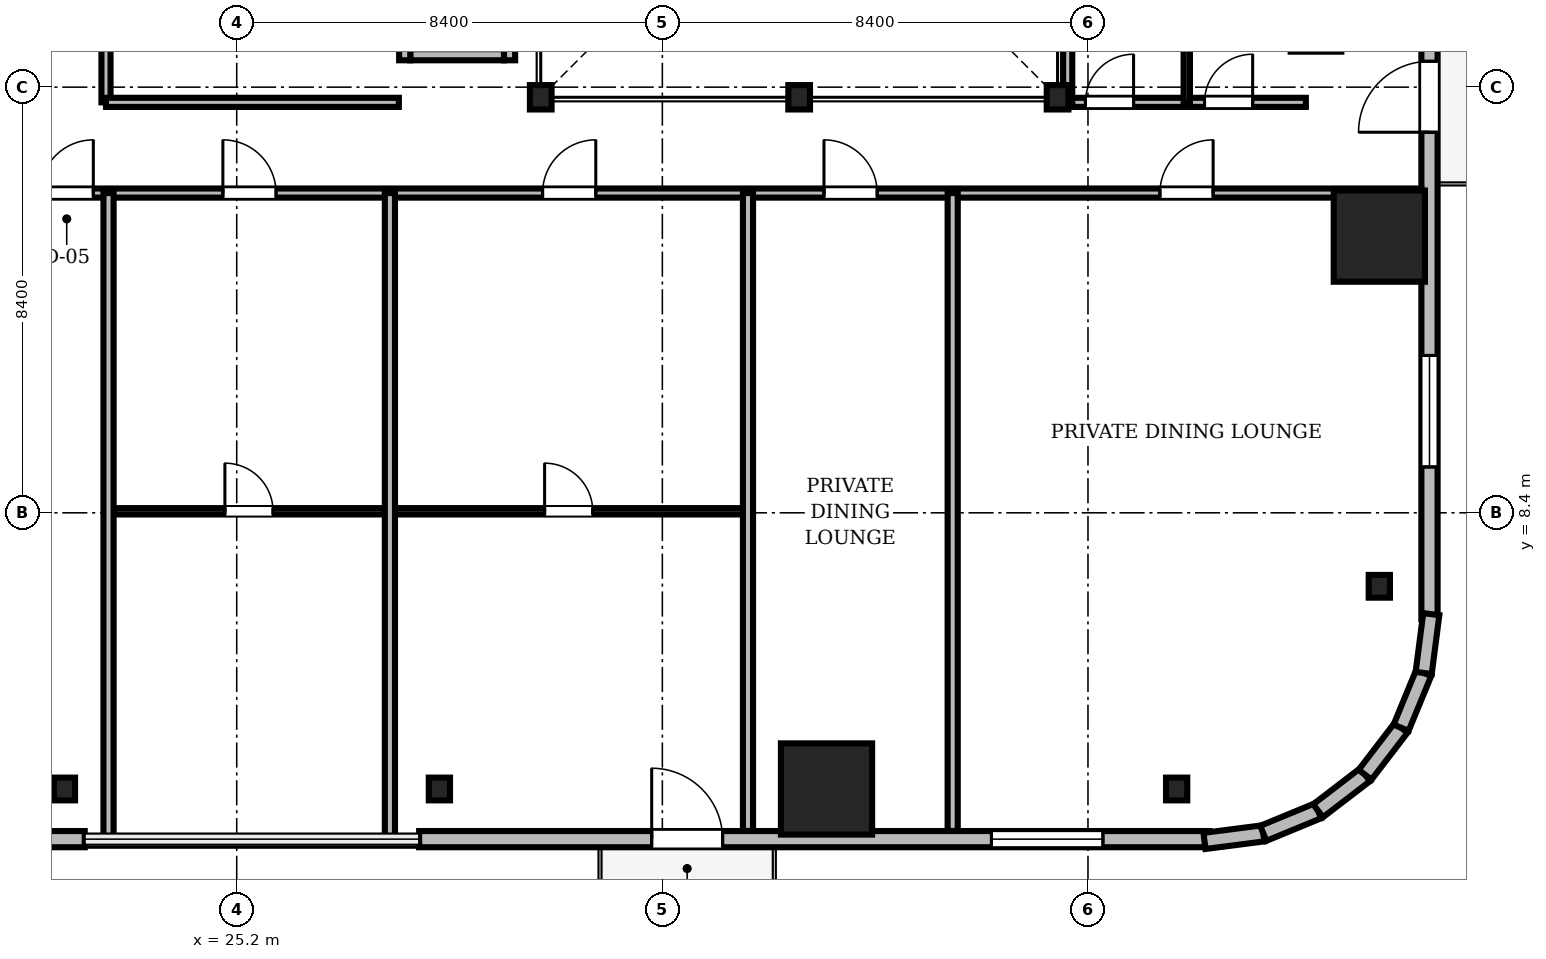
"""IFC4 building model, lengths in metres.
Left out: names, types, materials, properties, quantities, classifications, styles, units other than length and angle.
Written with IfcOpenShell. Run it as: python <this file> out.ifc"""

import sys

from ifc_helpers import new_model, si_unit, direction, frame, frame_2d, origin, origin_2d, place, context, subcontext, project, spatial, rectangle, i_section, extrude, source, transform, mapped, element, fill, save


model = new_model("IFC4")
c1 = context("Model", 3, precision=1e-05, world=origin(), true_north=direction((0.0, 1.0)))
c2 = subcontext(c1, "Body", "Model", "MODEL_VIEW")
j1 = project(units=[si_unit("LENGTHUNIT", "METRE"), si_unit("PLANEANGLEUNIT", "RADIAN")], contexts=[c1])
p1 = place(None, origin())
s1 = spatial("IfcSite", under=j1, at=p1, CompositionType="ELEMENT")
p2 = place(p1, origin())
s2 = spatial("IfcBuilding", under=s1, at=p2, CompositionType="ELEMENT")
p3 = place(p2, frame((0.0, 0.0, 67.75)))
s3 = spatial("IfcBuildingStorey", under=s2, at=p3, CompositionType="ELEMENT", Elevation=67.75)
m1 = source(origin(), c2, "Body", "SweptSolid", [
    extrude(i_section(OverallWidth=0.428, OverallDepth=0.481, WebThickness=0.04, FlangeThickness=0.063, FilletRadius=0.015, at=origin_2d()), origin(), (0.0, 0.0, 1.0), 3.41),
])
for number, where, z_axis, x_axis in (
    (1, (31.2, 16.6, 0.0), (0.0, 0.0, 1.0), (1.0, 0.0, 0.0)),
    (2, (36.3, 16.6, 0.0), (0.0, 0.0, 1.0), (1.0, 0.0, 0.0)),
    (3, (41.4, 16.6, 0.0), (0.0, 0.0, 1.0), (1.0, 0.0, 0.0)),
):
    element("IfcColumn", number, at=place(p3, frame(where, z_axis=z_axis, x_axis=x_axis)), inside=s3, PredefinedType="COLUMN", context=c2, shape_type="MappedRepresentation", body=[
        mapped(m1, transform((0.0, 0.0, 0.0), scale=1.0)),
    ])
m2 = source(origin(), c2, "Body", "SweptSolid", [
    extrude(rectangle(XDim=1.8, YDim=1.8, at=origin_2d()), origin(), (0.0, 0.0, 1.0), 3.41),
])
for number, where, z_axis, x_axis in (
    (4, (36.84, 2.95, 0.0), (0.0, 0.0, 1.0), (1.0, 0.0, 0.0)),
    (5, (47.75, 13.86, 0.0), (0.0, 0.0, 1.0), (1.0, 0.0, 0.0)),
):
    element("IfcColumn", number, at=place(p3, frame(where, z_axis=z_axis, x_axis=x_axis)), inside=s3, PredefinedType="COLUMN", context=c2, shape_type="MappedRepresentation", body=[
        mapped(m2, transform((0.0, 0.0, 0.0), scale=1.0)),
    ])
m3 = source(origin(), c2, "Body", "SweptSolid", [
    extrude(i_section(OverallWidth=0.419, OverallDepth=0.449, WebThickness=0.031, FlangeThickness=0.048, FilletRadius=0.015, at=origin_2d()), origin(), (0.0, 0.0, 1.0), 3.41),
])
for number, where, z_axis, x_axis in (
    (6, (21.8, 2.95, 0.0), (0.0, 0.0, 1.0), (1.0, 0.0, 0.0)),
    (7, (29.2, 2.95, 0.0), (0.0, 0.0, 1.0), (1.0, 0.0, 0.0)),
    (8, (43.75, 2.95, 0.0), (0.0, 0.0, 1.0), (1.0, 0.0, 0.0)),
    (9, (47.75, 6.95, 0.0), (0.0, 0.0, 1.0), (1.0, 0.0, 0.0)),
):
    element("IfcColumn", number, at=place(p3, frame(where, z_axis=z_axis, x_axis=x_axis)), inside=s3, PredefinedType="COLUMN", context=c2, shape_type="MappedRepresentation", body=[
        mapped(m3, transform((0.0, 0.0, 0.0), scale=1.0)),
    ])
m4 = source(origin(), c2, "Body", "SweptSolid", [
    extrude(rectangle(XDim=15.6, YDim=0.32, at=frame_2d((7.8, 0.0))), origin(), (0.0, 0.0, 1.0), 3.41),
])
p4 = place(p3, frame((6.6, 1.96, 0.0), z_axis=(0.0, 0.0, 1.0), x_axis=(1.0, 0.0, 0.0)))
e10 = element("IfcWall", 10, at=p4, inside=s3, PredefinedType="SOLIDWALL", context=c2, shape_type="MappedRepresentation", body=[
    mapped(m4, transform((0.0, 0.0, 0.0), scale=1.0)),
])
m5 = source(origin(), c2, "Body", "SweptSolid", [
    extrude(rectangle(XDim=2.2, YDim=2.4, at=frame_2d((1.1, 1.2))), frame((0.0, 0.17, 0.0), z_axis=(0.0, -1.0, 0.0), x_axis=(1.0, 0.0, 0.0)), (0.0, 0.0, 1.0), 0.34),
])
p5 = place(p4, frame((3.005, 0.0, 0.72)))
e11 = element("IfcOpeningElement", 11, at=p5, cuts=e10, PredefinedType="OPENING", context=c2, shape_type="MappedRepresentation", body=[
    mapped(m5, transform((0.0, 0.0, 0.0), scale=1.0)),
])
p6 = place(p3, frame((28.8, 1.96, 0.0), z_axis=(0.0, 0.0, 1.0), x_axis=(1.0, 0.0, 0.0)))
e12 = element("IfcWall", 12, at=p6, inside=s3, PredefinedType="SOLIDWALL", context=c2, shape_type="MappedRepresentation", body=[
    mapped(m4, transform((0.0, 0.0, 0.0), scale=1.0)),
])
m6 = source(origin(), c2, "Body", "SweptSolid", [
    extrude(rectangle(XDim=1.4, YDim=2.3, at=frame_2d((0.7, 1.15))), frame((0.0, 0.17, 0.0), z_axis=(0.0, -1.0, 0.0), x_axis=(1.0, 0.0, 0.0)), (0.0, 0.0, 1.0), 0.34),
])
p7 = place(p6, frame((4.59, 0.0, 0.0)))
e13 = element("IfcOpeningElement", 13, at=p7, cuts=e12, PredefinedType="OPENING", context=c2, shape_type="MappedRepresentation", body=[
    mapped(m6, transform((0.0, 0.0, 0.0), scale=1.0)),
])
p8 = place(p6, frame((11.295, 0.0, 0.72)))
e14 = element("IfcOpeningElement", 14, at=p8, cuts=e12, PredefinedType="OPENING", context=c2, shape_type="MappedRepresentation", body=[
    mapped(m5, transform((0.0, 0.0, 0.0), scale=1.0)),
])
p9 = place(p3, frame((48.74, 6.3, 0.0), z_axis=(0.0, 0.0, 1.0), x_axis=(0.0, 1.0, 0.0)))
e15 = element("IfcWall", 15, at=p9, inside=s3, PredefinedType="SOLIDWALL", context=c2, shape_type="MappedRepresentation", body=[
    mapped(m4, transform((0.0, 0.0, 0.0), scale=1.0)),
])
p10 = place(p9, frame((9.61, 0.0, 0.0)))
e16 = element("IfcOpeningElement", 16, at=p10, cuts=e15, PredefinedType="OPENING", context=c2, shape_type="MappedRepresentation", body=[
    mapped(m6, transform((0.0, 0.0, 0.0), scale=1.0)),
])
p11 = place(p9, frame((3.005, 0.0, 0.72)))
e17 = element("IfcOpeningElement", 17, at=p11, cuts=e15, PredefinedType="OPENING", context=c2, shape_type="MappedRepresentation", body=[
    mapped(m5, transform((0.0, 0.0, 0.0), scale=1.0)),
])
m7 = source(origin(), c2, "Body", "SweptSolid", [
    extrude(rectangle(XDim=1.17, YDim=0.32, at=frame_2d((0.585, 0.0))), origin(), (0.0, 0.0, 1.0), 3.41),
])
p12 = place(p3, frame((44.3, 1.925, 0.0), z_axis=(0.0, 0.0, 1.0), x_axis=(0.991762485493, 0.128090485085, 0.0)))
e18 = element("IfcWall", 18, at=p12, inside=s3, PredefinedType="SOLIDWALL", context=c2, shape_type="MappedRepresentation", body=[
    mapped(m7, transform((0.0, 0.0, 0.0), scale=1.0)),
])
m8 = source(origin(), c2, "Body", "SweptSolid", [
    extrude(rectangle(XDim=1.169, YDim=0.32, at=frame_2d((0.585, 0.0))), origin(), (0.0, 0.0, 1.0), 3.41),
])
p13 = place(p3, frame((45.46, 2.074, 0.0), z_axis=(0.0, 0.0, 1.0), x_axis=(0.924479075121, 0.381232789334, 0.0)))
e19 = element("IfcWall", 19, at=p13, inside=s3, PredefinedType="SOLIDWALL", context=c2, shape_type="MappedRepresentation", body=[
    mapped(m8, transform((0.0, 0.0, 0.0), scale=1.0)),
])
m9 = source(origin(), c2, "Body", "SweptSolid", [
    extrude(rectangle(XDim=1.169, YDim=0.32, at=frame_2d((0.584, 0.0))), origin(), (0.0, 0.0, 1.0), 3.41),
])
p14 = place(p3, frame((46.541, 2.52, 0.0), z_axis=(0.0, 0.0, 1.0), x_axis=(0.793663520347, 0.608356981114, 0.0)))
e20 = element("IfcWall", 20, at=p14, inside=s3, PredefinedType="SOLIDWALL", context=c2, shape_type="MappedRepresentation", body=[
    mapped(m9, transform((0.0, 0.0, 0.0), scale=1.0)),
])
m10 = source(origin(), c2, "Body", "SweptSolid", [
    extrude(rectangle(XDim=1.169, YDim=0.32, at=frame_2d((0.584, 0.0))), origin(), (0.0, 0.0, 1.0), 3.41),
])
for number, where, z_axis, x_axis in (
    (21, (47.469, 3.231, 0.0), (0.0, 0.0, 1.0), (0.608, 0.794, 0.0)),
    (22, (48.18, 4.159, 0.0), (0.0, 0.0, 1.0), (0.381, 0.925, 0.0)),
):
    element("IfcWall", number, at=place(p3, frame(where, z_axis=z_axis, x_axis=x_axis)), inside=s3, PredefinedType="SOLIDWALL", context=c2, shape_type="MappedRepresentation", body=[
        mapped(m10, transform((0.0, 0.0, 0.0), scale=1.0)),
    ])
m11 = source(origin(), c2, "Body", "SweptSolid", [
    extrude(rectangle(XDim=1.171, YDim=0.32, at=frame_2d((0.585, 0.0))), origin(), (0.0, 0.0, 1.0), 3.41),
])
p15 = place(p3, frame((48.625, 5.24, 0.0), z_axis=(0.0, 0.0, 1.0), x_axis=(0.128269133229, 0.991739395941, 0.0)))
e23 = element("IfcWall", 23, at=p15, inside=s3, PredefinedType="SOLIDWALL", context=c2, shape_type="MappedRepresentation", body=[
    mapped(m11, transform((0.0, 0.0, 0.0), scale=1.0)),
])
m12 = source(origin(), c2, "Body", "SweptSolid", [
    extrude(rectangle(XDim=1.85, YDim=0.22, at=frame_2d((0.925, 0.0))), origin(), (0.0, 0.0, 1.0), 3.41),
])
p16 = place(p3, frame((28.625, 17.44, 0.0), z_axis=(0.0, 0.0, 1.0), x_axis=(1.0, 0.0, 0.0)))
e24 = element("IfcWall", 24, at=p16, inside=s3, PredefinedType="SOLIDWALL", context=c2, shape_type="MappedRepresentation", body=[
    mapped(m12, transform((0.0, 0.0, 0.0), scale=1.0)),
])
m13 = source(origin(), c2, "Body", "SweptSolid", [
    extrude(rectangle(XDim=2.54, YDim=0.22, at=frame_2d((1.27, 0.0))), origin(), (0.0, 0.0, 1.0), 3.41),
])
for number, where, z_axis, x_axis in (
    (25, (28.515, 17.33, 0.0), (0.0, 0.0, 1.0), (0.0, 1.0, 0.0)),
    (26, (30.585, 17.33, 0.0), (0.0, 0.0, 1.0), (0.0, 1.0, 0.0)),
):
    element("IfcWall", number, at=place(p3, frame(where, z_axis=z_axis, x_axis=x_axis)), inside=s3, PredefinedType="SOLIDWALL", context=c2, shape_type="MappedRepresentation", body=[
        mapped(m13, transform((0.0, 0.0, 0.0), scale=1.0)),
    ])
m14 = source(origin(), c2, "Body", "SweptSolid", [
    extrude(rectangle(XDim=46.156, YDim=0.18, at=frame_2d((23.078, 0.0))), origin(), (0.0, 0.0, 1.0), 2.652),
])
p17 = place(p3, frame((2.422, 14.71, 0.0), z_axis=(0.0, 0.0, 1.0), x_axis=(1.0, 0.0, 0.0)))
e27 = element("IfcWall", 27, at=p17, inside=s3, PredefinedType="PARTITIONING", context=c2, shape_type="MappedRepresentation", body=[
    mapped(m14, transform((0.0, 0.0, 0.0), scale=1.0)),
])
m15 = source(origin(), c2, "Body", "SweptSolid", [
    extrude(rectangle(XDim=1.05, YDim=2.2, at=frame_2d((0.525, 1.1))), frame((0.0, 0.1, 0.0), z_axis=(0.0, -1.0, 0.0), x_axis=(1.0, 0.0, 0.0)), (0.0, 0.0, 1.0), 0.2),
])
p18 = place(p17, frame((18.898, 0.0, 0.0)))
e28 = element("IfcOpeningElement", 28, at=p18, cuts=e27, PredefinedType="OPENING", context=c2, shape_type="MappedRepresentation", body=[
    mapped(m15, transform((0.0, 0.0, 0.0), scale=1.0)),
])
p19 = place(p17, frame((22.505, 0.0, 0.0)))
e29 = element("IfcOpeningElement", 29, at=p19, cuts=e27, PredefinedType="OPENING", context=c2, shape_type="MappedRepresentation", body=[
    mapped(m15, transform((0.0, 0.0, 0.0), scale=1.0)),
])
p20 = place(p17, frame((28.814, 0.0, 0.0)))
e30 = element("IfcOpeningElement", 30, at=p20, cuts=e27, PredefinedType="OPENING", context=c2, shape_type="MappedRepresentation", body=[
    mapped(m15, transform((0.0, 0.0, 0.0), scale=1.0)),
])
p21 = place(p17, frame((34.368, 0.0, 0.0)))
e31 = element("IfcOpeningElement", 31, at=p21, cuts=e27, PredefinedType="OPENING", context=c2, shape_type="MappedRepresentation", body=[
    mapped(m15, transform((0.0, 0.0, 0.0), scale=1.0)),
])
p22 = place(p17, frame((40.998, 0.0, 0.0)))
e32 = element("IfcOpeningElement", 32, at=p22, cuts=e27, PredefinedType="OPENING", context=c2, shape_type="MappedRepresentation", body=[
    mapped(m15, transform((0.0, 0.0, 0.0), scale=1.0)),
])
m16 = source(origin(), c2, "Body", "SweptSolid", [
    extrude(rectangle(XDim=7.067, YDim=0.125, at=frame_2d((3.534, 0.0))), origin(), (0.0, 0.0, 1.0), 2.802),
])
p23 = place(p3, frame((28.223, 8.43, 0.0), z_axis=(0.0, 0.0, 1.0), x_axis=(1.0, 0.0, 0.0)))
e33 = element("IfcWall", 33, at=p23, inside=s3, PredefinedType="PARTITIONING", context=c2, shape_type="MappedRepresentation", body=[
    mapped(m16, transform((0.0, 0.0, 0.0), scale=1.0)),
])
m17 = source(origin(), c2, "Body", "SweptSolid", [
    extrude(rectangle(XDim=0.95, YDim=2.15, at=frame_2d((0.475, 1.075))), frame((0.0, 0.073, 0.0), z_axis=(0.0, -1.0, 0.0), x_axis=(1.0, 0.0, 0.0)), (0.0, 0.0, 1.0), 0.145),
])
p24 = place(p23, frame((3.053, 0.0, 0.0)))
e34 = element("IfcOpeningElement", 34, at=p24, cuts=e33, PredefinedType="OPENING", context=c2, shape_type="MappedRepresentation", body=[
    mapped(m17, transform((0.0, 0.0, 0.0), scale=1.0)),
])
m18 = source(origin(), c2, "Body", "SweptSolid", [
    extrude(rectangle(XDim=5.553, YDim=0.125, at=frame_2d((2.776, 0.0))), origin(), (0.0, 0.0, 1.0), 2.802),
])
p25 = place(p3, frame((22.67, 8.43, 0.0), z_axis=(0.0, 0.0, 1.0), x_axis=(1.0, 0.0, 0.0)))
e35 = element("IfcWall", 35, at=p25, inside=s3, PredefinedType="PARTITIONING", context=c2, shape_type="MappedRepresentation", body=[
    mapped(m18, transform((0.0, 0.0, 0.0), scale=1.0)),
])
p26 = place(p25, frame((2.297, 0.0, 0.0)))
e36 = element("IfcOpeningElement", 36, at=p26, cuts=e35, PredefinedType="OPENING", context=c2, shape_type="MappedRepresentation", body=[
    mapped(m17, transform((0.0, 0.0, 0.0), scale=1.0)),
])
m19 = source(origin(), c2, "Body", "SweptSolid", [
    extrude(rectangle(XDim=4.7, YDim=0.18, at=frame_2d((2.35, 0.0))), origin(), (0.0, 0.0, 1.0), 2.802),
])
p27 = place(p3, frame((41.6, 16.5, 0.0), z_axis=(0.0, 0.0, 1.0), x_axis=(1.0, 0.0, 0.0)))
e37 = element("IfcWall", 37, at=p27, inside=s3, PredefinedType="PARTITIONING", context=c2, shape_type="MappedRepresentation", body=[
    mapped(m19, transform((0.0, 0.0, 0.0), scale=1.0)),
])
m20 = source(origin(), c2, "Body", "SweptSolid", [
    extrude(rectangle(XDim=0.95, YDim=2.15, at=frame_2d((0.475, 1.075))), frame((0.0, 0.1, 0.0), z_axis=(0.0, -1.0, 0.0), x_axis=(1.0, 0.0, 0.0)), (0.0, 0.0, 1.0), 0.2),
])
p28 = place(p27, frame((0.35, 0.0, 0.0)))
e38 = element("IfcOpeningElement", 38, at=p28, cuts=e37, PredefinedType="OPENING", context=c2, shape_type="MappedRepresentation", body=[
    mapped(m20, transform((0.0, 0.0, 0.0), scale=1.0)),
])
p29 = place(p27, frame((2.7, 0.0, 0.0)))
e39 = element("IfcOpeningElement", 39, at=p29, cuts=e37, PredefinedType="OPENING", context=c2, shape_type="MappedRepresentation", body=[
    mapped(m20, transform((0.0, 0.0, 0.0), scale=1.0)),
])
m21 = source(origin(), c2, "Body", "SweptSolid", [
    extrude(rectangle(XDim=3.55, YDim=0.18, at=frame_2d((1.775, 0.0))), origin(), (0.0, 0.0, 1.0), 2.802),
])
p30 = place(p3, frame((22.62, 16.5, 0.0), z_axis=(0.0, 0.0, 1.0), x_axis=(0.0, 1.0, 0.0)))
e40 = element("IfcWall", 40, at=p30, inside=s3, PredefinedType="PARTITIONING", context=c2, shape_type="MappedRepresentation", body=[
    mapped(m21, transform((0.0, 0.0, 0.0), scale=1.0)),
])
p31 = place(p30, frame((1.15, 0.0, 0.0)))
e41 = element("IfcOpeningElement", 41, at=p31, cuts=e40, PredefinedType="OPENING", context=c2, shape_type="MappedRepresentation", body=[
    mapped(m15, transform((0.0, 0.0, 0.0), scale=1.0)),
])
m22 = source(origin(), c2, "Body", "SweptSolid", [
    extrude(rectangle(XDim=12.78, YDim=0.2, at=frame_2d((6.39, 0.0))), origin(), (0.0, 0.0, 1.0), 2.652),
])
for number, where, z_axis, x_axis in (
    (42, (22.67, 1.93, 0.0), (0.0, 0.0, 1.0), (0.0, 1.0, 0.0)),
    (43, (28.223, 1.93, 0.0), (0.0, 0.0, 1.0), (0.0, 1.0, 0.0)),
):
    element("IfcWall", number, at=place(p3, frame(where, z_axis=z_axis, x_axis=x_axis)), inside=s3, PredefinedType="PARTITIONING", context=c2, shape_type="MappedRepresentation", body=[
        mapped(m22, transform((0.0, 0.0, 0.0), scale=1.0)),
    ])
m23 = source(origin(), c2, "Body", "SweptSolid", [
    extrude(rectangle(XDim=12.588, YDim=0.2, at=frame_2d((6.294, 0.0))), origin(), (0.0, 0.0, 1.0), 2.652),
])
for number, where, z_axis, x_axis in (
    (44, (35.29, 2.122, 0.0), (0.0, 0.0, 1.0), (0.0, 1.0, 0.0)),
    (45, (39.33, 2.122, 0.0), (0.0, 0.0, 1.0), (0.0, 1.0, 0.0)),
):
    element("IfcWall", number, at=place(p3, frame(where, z_axis=z_axis, x_axis=x_axis)), inside=s3, PredefinedType="PARTITIONING", context=c2, shape_type="MappedRepresentation", body=[
        mapped(m23, transform((0.0, 0.0, 0.0), scale=1.0)),
    ])
m24 = source(origin(), c2, "Body", "SweptSolid", [
    extrude(rectangle(XDim=7.15, YDim=0.18, at=frame_2d((3.575, 0.0))), origin(), (0.0, 0.0, 1.0), 2.802),
])
p32 = place(p3, frame((41.6, 16.5, 0.0), z_axis=(0.0, 0.0, 1.0), x_axis=(0.0, 1.0, 0.0)))
e46 = element("IfcWall", 46, at=p32, inside=s3, PredefinedType="PARTITIONING", context=c2, shape_type="MappedRepresentation", body=[
    mapped(m24, transform((0.0, 0.0, 0.0), scale=1.0)),
])
m25 = source(origin(), c2, "Body", "SweptSolid", [
    extrude(rectangle(XDim=7.15, YDim=0.125, at=frame_2d((3.575, 0.0))), origin(), (0.0, 0.0, 1.0), 2.802),
])
p33 = place(p3, frame((43.95, 16.5, 0.0), z_axis=(0.0, 0.0, 1.0), x_axis=(0.0, 1.0, 0.0)))
e47 = element("IfcWall", 47, at=p33, inside=s3, PredefinedType="PARTITIONING", context=c2, shape_type="MappedRepresentation", body=[
    mapped(m25, transform((0.0, 0.0, 0.0), scale=1.0)),
])
m26 = source(origin(), c2, "Body", "SweptSolid", [
    extrude(rectangle(XDim=5.78, YDim=0.18, at=frame_2d((2.89, 0.0))), origin(), (0.0, 0.0, 1.0), 2.802),
])
p34 = place(p3, frame((22.62, 16.5, 0.0), z_axis=(0.0, 0.0, 1.0), x_axis=(1.0, 0.0, 0.0)))
e48 = element("IfcWall", 48, at=p34, inside=s3, PredefinedType="PARTITIONING", context=c2, shape_type="MappedRepresentation", body=[
    mapped(m26, transform((0.0, 0.0, 0.0), scale=1.0)),
])
m27 = source(origin(), c2, "Body", "SweptSolid", [
    extrude(rectangle(XDim=1.4, YDim=2.3, at=frame_2d((0.7, 1.15))), frame((0.0, 0.025, 0.0), z_axis=(0.0, -1.0, 0.0), x_axis=(1.0, 0.0, 0.0)), (0.0, 0.0, 1.0), 0.05),
])
p35 = place(p7, frame((1.4, 0.0, 0.0), z_axis=(0.0, 0.0, 1.0), x_axis=(-1.0, 0.0, 0.0)))
e49 = element("IfcDoor", 49, at=p35, inside=s3, OperationType="DOUBLE_DOOR_SLIDING", PredefinedType="DOOR", context=c2, shape_type="MappedRepresentation", body=[
    mapped(m27, transform((0.0, 0.0, 0.0), scale=1.0)),
])
fill(e13, e49)
m28 = source(origin(), c2, "Body", "SweptSolid", [
    extrude(rectangle(XDim=2.2, YDim=2.4, at=frame_2d((1.1, 1.2))), frame((0.0, 0.03, 0.0), z_axis=(0.0, -1.0, 0.0), x_axis=(1.0, 0.0, 0.0)), (0.0, 0.0, 1.0), 0.06),
])
p36 = place(p8, origin())
e50 = element("IfcWindow", 50, at=p36, inside=s3, PartitioningType="SINGLE_PANEL", PredefinedType="WINDOW", context=c2, shape_type="MappedRepresentation", body=[
    mapped(m28, transform((0.0, 0.0, 0.0), scale=1.0)),
])
fill(e14, e50)
p37 = place(p10, frame((1.4, 0.0, 0.0), z_axis=(0.0, 0.0, 1.0), x_axis=(-1.0, 0.0, 0.0)))
e51 = element("IfcDoor", 51, at=p37, inside=s3, OperationType="DOUBLE_DOOR_SLIDING", PredefinedType="DOOR", context=c2, shape_type="MappedRepresentation", body=[
    mapped(m27, transform((0.0, 0.0, 0.0), scale=1.0)),
])
fill(e16, e51)
p38 = place(p11, origin())
e52 = element("IfcWindow", 52, at=p38, inside=s3, PartitioningType="SINGLE_PANEL", PredefinedType="WINDOW", context=c2, shape_type="MappedRepresentation", body=[
    mapped(m28, transform((0.0, 0.0, 0.0), scale=1.0)),
])
fill(e17, e52)
m29 = source(origin(), c2, "Body", "SweptSolid", [
    extrude(rectangle(XDim=1.05, YDim=2.2, at=frame_2d((0.525, 1.1))), frame((0.0, 0.025, 0.0), z_axis=(0.0, -1.0, 0.0), x_axis=(1.0, 0.0, 0.0)), (0.0, 0.0, 1.0), 0.05),
])
p39 = place(p18, origin())
e53 = element("IfcDoor", 53, at=p39, inside=s3, OperationType="SINGLE_SWING_RIGHT", PredefinedType="DOOR", context=c2, shape_type="MappedRepresentation", body=[
    mapped(m29, transform((0.0, 0.0, 0.0), scale=1.0)),
])
fill(e28, e53)
p40 = place(p19, origin())
e54 = element("IfcDoor", 54, at=p40, inside=s3, OperationType="SINGLE_SWING_LEFT", PredefinedType="DOOR", context=c2, shape_type="MappedRepresentation", body=[
    mapped(m29, transform((0.0, 0.0, 0.0), scale=1.0)),
])
fill(e29, e54)
p41 = place(p20, origin())
e55 = element("IfcDoor", 55, at=p41, inside=s3, OperationType="SINGLE_SWING_RIGHT", PredefinedType="DOOR", context=c2, shape_type="MappedRepresentation", body=[
    mapped(m29, transform((0.0, 0.0, 0.0), scale=1.0)),
])
fill(e30, e55)
p42 = place(p21, origin())
e56 = element("IfcDoor", 56, at=p42, inside=s3, OperationType="SINGLE_SWING_LEFT", PredefinedType="DOOR", context=c2, shape_type="MappedRepresentation", body=[
    mapped(m29, transform((0.0, 0.0, 0.0), scale=1.0)),
])
fill(e31, e56)
p43 = place(p22, origin())
e57 = element("IfcDoor", 57, at=p43, inside=s3, OperationType="SINGLE_SWING_RIGHT", PredefinedType="DOOR", context=c2, shape_type="MappedRepresentation", body=[
    mapped(m29, transform((0.0, 0.0, 0.0), scale=1.0)),
])
fill(e32, e57)
m30 = source(origin(), c2, "Body", "SweptSolid", [
    extrude(rectangle(XDim=0.95, YDim=2.15, at=frame_2d((0.475, 1.075))), frame((0.0, 0.025, 0.0), z_axis=(0.0, -1.0, 0.0), x_axis=(1.0, 0.0, 0.0)), (0.0, 0.0, 1.0), 0.05),
])
p44 = place(p24, origin())
e58 = element("IfcDoor", 58, at=p44, inside=s3, OperationType="SINGLE_SWING_LEFT", PredefinedType="DOOR", context=c2, shape_type="MappedRepresentation", body=[
    mapped(m30, transform((0.0, 0.0, 0.0), scale=1.0)),
])
fill(e34, e58)
p45 = place(p26, origin())
e59 = element("IfcDoor", 59, at=p45, inside=s3, OperationType="SINGLE_SWING_LEFT", PredefinedType="DOOR", context=c2, shape_type="MappedRepresentation", body=[
    mapped(m30, transform((0.0, 0.0, 0.0), scale=1.0)),
])
fill(e36, e59)
p46 = place(p28, origin())
e60 = element("IfcDoor", 60, at=p46, inside=s3, OperationType="SINGLE_SWING_RIGHT", PredefinedType="DOOR", context=c2, shape_type="MappedRepresentation", body=[
    mapped(m30, transform((0.0, 0.0, 0.0), scale=1.0)),
])
fill(e38, e60)
p47 = place(p29, origin())
e61 = element("IfcDoor", 61, at=p47, inside=s3, OperationType="SINGLE_SWING_RIGHT", PredefinedType="DOOR", context=c2, shape_type="MappedRepresentation", body=[
    mapped(m30, transform((0.0, 0.0, 0.0), scale=1.0)),
])
fill(e39, e61)
save(model, sys.argv[1])
